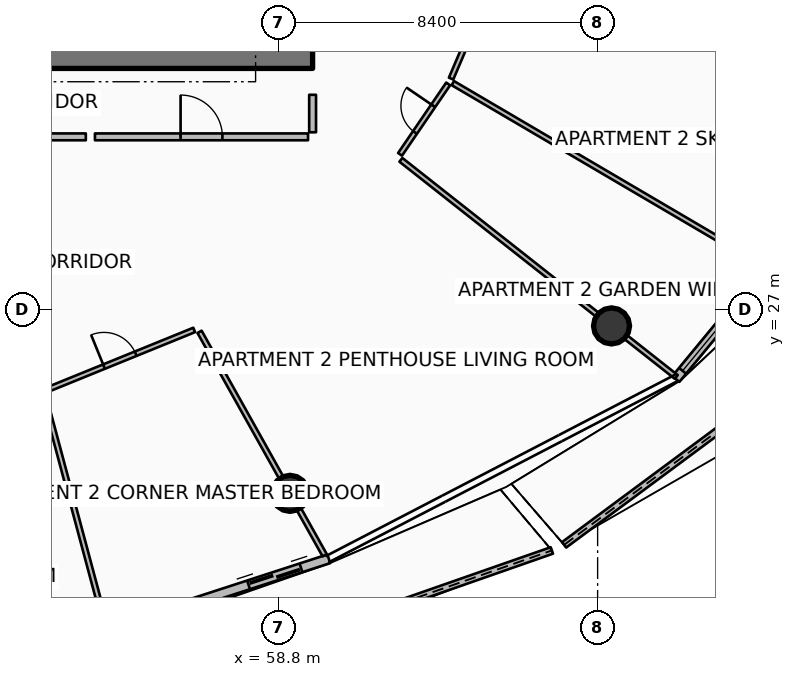
"""IFC4 building model, lengths in metres.
Left out: names, types, materials, properties, quantities, classifications, styles, units other than length and angle.
Written with IfcOpenShell. Run it as: python <this file> out.ifc"""

import sys

from ifc_helpers import new_model, si_unit, direction, frame, frame_2d, origin, origin_2d, place, context, subcontext, project, spatial, polyline, rectangle, circle, outline, extrude, element, fill, save


model = new_model("IFC4")
c1 = context("Model", 3, precision=1e-05, world=origin(), true_north=direction((0.0, 1.0)))
c2 = subcontext(c1, "Body", "Model", "MODEL_VIEW")
j1 = project(units=[si_unit("LENGTHUNIT", "METRE"), si_unit("PLANEANGLEUNIT", "RADIAN")], contexts=[c1])
p1 = place(None, origin())
s1 = spatial("IfcSite", under=j1, at=p1, CompositionType="ELEMENT")
p2 = place(p1, origin())
s2 = spatial("IfcBuilding", under=s1, at=p2, CompositionType="ELEMENT")
p3 = place(p2, frame((0.0, 0.0, 248.25)))
s3 = spatial("IfcBuildingStorey", under=s2, at=p3, CompositionType="ELEMENT", Elevation=248.25)
p4 = place(p3, frame((49.95, 33.675, 0.0), z_axis=(0.0, 0.0, 1.0), x_axis=(1.0, 0.0, 0.0)))
e1 = element("IfcWall", 1, at=p4, inside=s3, PredefinedType="SHEAR", context=c2, shape_type="SweptSolid", body=[
    extrude(rectangle(XDim=9.75, YDim=0.65, at=frame_2d((4.875, 0.0))), origin(), (0.0, 0.0, 1.0), 3.85),
])
for number, where, z_axis, x_axis in (
    (2, (59.105, 22.17, 0.0), (0.0, 0.0, 1.0), (1.0, 0.0, 0.0)),
    (3, (67.566, 26.575, 0.0), (0.0, 0.0, 1.0), (1.0, 0.0, 0.0)),
):
    element("IfcColumn", number, at=place(p3, frame(where, z_axis=z_axis, x_axis=x_axis)), inside=s3, PredefinedType="COLUMN", context=c2, shape_type="SweptSolid", body=[
        extrude(circle(Radius=0.475, at=origin_2d()), origin(), (0.0, 0.0, 1.0), 3.59),
    ])
p5 = place(p3, frame((56.173, 17.234, 0.0), z_axis=(0.0, 0.0, 1.0), x_axis=(0.944003849273, 0.329934436757, 0.0)))
e4 = element("IfcWall", 4, at=p5, inside=s3, PredefinedType="PARAPET", context=c2, shape_type="SweptSolid", body=[
    extrude(outline(polyline([(0.0, 0.0), (10.406, 0.0), (10.406, 1.483), (5.203, 1.284), (0.0, 1.148), (0.0, 0.0)])), frame((0.0, 0.09, 0.0), z_axis=(0.0, -1.0, 0.0), x_axis=(1.0, 0.0, 0.0)), (0.0, 0.0, 1.0), 0.18),
])
p6 = place(p3, frame((66.319, 20.815, 0.0), z_axis=(0.0, 0.0, 1.0), x_axis=(0.803330402034, 0.59553359701, 0.0)))
e5 = element("IfcWall", 5, at=p6, inside=s3, PredefinedType="PARAPET", context=c2, shape_type="SweptSolid", body=[
    extrude(outline(polyline([(0.0, 0.0), (11.674, 0.0), (11.674, 1.832), (5.837, 1.696), (0.0, 1.497), (0.0, 0.0)])), frame((0.0, 0.09, 0.0), z_axis=(0.0, -1.0, 0.0), x_axis=(1.0, 0.0, 0.0)), (0.0, 0.0, 1.0), 0.18),
])
p7 = place(p3, frame((50.858, 17.436, 0.0), z_axis=(0.0, 0.0, 1.0), x_axis=(0.951055974609, 0.309018661507, 0.0)))
e6 = element("IfcWall", 6, at=p7, inside=s3, PredefinedType="SOLIDWALL", context=c2, shape_type="SweptSolid", body=[
    extrude(rectangle(XDim=9.745, YDim=0.24, at=frame_2d((4.873, 0.0))), origin(), (0.0, 0.0, 1.0), 2.54),
])
p8 = place(p7, frame((7.525, 0.0, 0.0)))
e7 = element("IfcOpeningElement", 7, at=p8, cuts=e6, PredefinedType="OPENING", context=c2, shape_type="SweptSolid", body=[
    extrude(rectangle(XDim=1.45, YDim=2.15, at=frame_2d((0.725, 1.075))), frame((0.0, 0.13, 0.0), z_axis=(0.0, -1.0, 0.0), x_axis=(1.0, 0.0, 0.0)), (0.0, 0.0, 1.0), 0.26),
])
p9 = place(p7, frame((0.28, 0.0, 0.65)))
e8 = element("IfcOpeningElement", 8, at=p9, cuts=e6, PredefinedType="OPENING", context=c2, shape_type="SweptSolid", body=[
    extrude(rectangle(XDim=1.6, YDim=1.5, at=frame_2d((0.8, 0.75))), frame((0.0, 0.13, 0.0), z_axis=(0.0, -1.0, 0.0), x_axis=(1.0, 0.0, 0.0)), (0.0, 0.0, 1.0), 0.26),
])
p10 = place(p3, frame((69.258, 25.178, 0.0), z_axis=(0.0, 0.0, 1.0), x_axis=(0.636680093065, 0.771128043255, 0.0)))
e9 = element("IfcWall", 9, at=p10, inside=s3, PredefinedType="SOLIDWALL", context=c2, shape_type="SweptSolid", body=[
    extrude(rectangle(XDim=11.438, YDim=0.24, at=frame_2d((5.719, 0.0))), origin(), (0.0, 0.0, 1.0), 2.54),
])
p11 = place(p10, frame((9.218, 0.0, 0.0)))
e10 = element("IfcOpeningElement", 10, at=p11, cuts=e9, PredefinedType="OPENING", context=c2, shape_type="SweptSolid", body=[
    extrude(rectangle(XDim=1.45, YDim=2.15, at=frame_2d((0.725, 1.075))), frame((0.0, 0.13, 0.0), z_axis=(0.0, -1.0, 0.0), x_axis=(1.0, 0.0, 0.0)), (0.0, 0.0, 1.0), 0.26),
])
p12 = place(p10, frame((0.28, 0.0, 0.65)))
e11 = element("IfcOpeningElement", 11, at=p12, cuts=e9, PredefinedType="OPENING", context=c2, shape_type="SweptSolid", body=[
    extrude(rectangle(XDim=1.6, YDim=1.5, at=frame_2d((0.8, 0.75))), frame((0.0, 0.13, 0.0), z_axis=(0.0, -1.0, 0.0), x_axis=(1.0, 0.0, 0.0)), (0.0, 0.0, 1.0), 0.26),
])
p13 = place(p3, frame((53.972, 31.55, 0.0), z_axis=(0.0, 0.0, 1.0), x_axis=(1.0, 0.0, 0.0)))
e12 = element("IfcWall", 12, at=p13, inside=s3, PredefinedType="PARTITIONING", context=c2, shape_type="SweptSolid", body=[
    extrude(rectangle(XDim=5.608, YDim=0.18, at=frame_2d((2.804, 0.0))), origin(), (0.0, 0.0, 1.0), 2.957),
])
p14 = place(p13, frame((2.254, 0.0, 0.0)))
e13 = element("IfcOpeningElement", 13, at=p14, cuts=e12, PredefinedType="OPENING", context=c2, shape_type="SweptSolid", body=[
    extrude(rectangle(XDim=1.1, YDim=2.1, at=frame_2d((0.55, 1.05))), frame((0.0, 0.1, 0.0), z_axis=(0.0, -1.0, 0.0), x_axis=(1.0, 0.0, 0.0)), (0.0, 0.0, 1.0), 0.2),
])
p15 = place(p3, frame((59.7, 31.67, 0.0), z_axis=(0.0, 0.0, 1.0), x_axis=(0.0, 1.0, 0.0)))
e14 = element("IfcWall", 14, at=p15, inside=s3, PredefinedType="PARTITIONING", context=c2, shape_type="SweptSolid", body=[
    extrude(rectangle(XDim=0.987, YDim=0.18, at=frame_2d((0.493, 0.0))), origin(), (0.0, 0.0, 1.0), 2.957),
])
p16 = place(p3, frame((49.357, 31.55, 0.0), z_axis=(0.0, 0.0, 1.0), x_axis=(1.0, 0.0, 0.0)))
e15 = element("IfcWall", 15, at=p16, inside=s3, PredefinedType="PARTITIONING", context=c2, shape_type="SweptSolid", body=[
    extrude(rectangle(XDim=4.376, YDim=0.18, at=frame_2d((2.188, 0.0))), origin(), (0.0, 0.0, 1.0), 2.957),
])
p17 = place(p3, frame((56.725, 26.42, 0.0), z_axis=(0.0, 0.0, 1.0), x_axis=(0.488624332812, -0.872494275846, 0.0)))
e16 = element("IfcWall", 16, at=p17, inside=s3, PredefinedType="PARTITIONING", context=c2, shape_type="SweptSolid", body=[
    extrude(rectangle(XDim=6.738, YDim=0.125, at=frame_2d((3.369, 0.0))), origin(), (0.0, 0.0, 1.0), 2.957),
])
p18 = place(p3, frame((52.621, 24.762, 0.0), z_axis=(0.0, 0.0, 1.0), x_axis=(0.258970884365, -0.96588512829, 0.0)))
e17 = element("IfcWall", 17, at=p18, inside=s3, PredefinedType="PARTITIONING", context=c2, shape_type="SweptSolid", body=[
    extrude(rectangle(XDim=6.306, YDim=0.125, at=frame_2d((3.153, 0.0))), origin(), (0.0, 0.0, 1.0), 3.03),
])
p19 = place(p3, frame((52.672, 24.879, 0.0), z_axis=(0.0, 0.0, 1.0), x_axis=(0.926344303187, 0.376677888857, 0.0)))
e18 = element("IfcWall", 18, at=p19, inside=s3, PredefinedType="PARTITIONING", context=c2, shape_type="SweptSolid", body=[
    extrude(rectangle(XDim=4.223, YDim=0.125, at=frame_2d((2.111, 0.0))), origin(), (0.0, 0.0, 1.0), 2.957),
])
p20 = place(p19, frame((1.661, 0.0, 0.0)))
e19 = element("IfcOpeningElement", 19, at=p20, cuts=e18, PredefinedType="OPENING", context=c2, shape_type="SweptSolid", body=[
    extrude(rectangle(XDim=0.9, YDim=2.08, at=frame_2d((0.45, 1.04))), frame((0.0, 0.073, 0.0), z_axis=(0.0, -1.0, 0.0), x_axis=(1.0, 0.0, 0.0)), (0.0, 0.0, 1.0), 0.145),
])
p21 = place(p3, frame((62.023, 30.945, 0.0), z_axis=(0.0, 0.0, 1.0), x_axis=(0.785322102606, -0.619087388952, 0.0)))
e20 = element("IfcWall", 20, at=p21, inside=s3, PredefinedType="PARTITIONING", context=c2, shape_type="SweptSolid", body=[
    extrude(rectangle(XDim=9.228, YDim=0.125, at=frame_2d((4.614, 0.0))), origin(), (0.0, 0.0, 1.0), 2.957),
])
p22 = place(p3, frame((63.39, 32.963, 0.0), z_axis=(0.0, 0.0, 1.0), x_axis=(0.862331921897, -0.506343417532, 0.0)))
e21 = element("IfcWall", 21, at=p22, inside=s3, PredefinedType="PARTITIONING", context=c2, shape_type="SweptSolid", body=[
    extrude(rectangle(XDim=9.478, YDim=0.125, at=frame_2d((4.739, 0.0))), origin(), (0.0, 0.0, 1.0), 3.03),
])
p23 = place(p3, frame((62.001, 31.089, 0.0), z_axis=(0.0, 0.0, 1.0), x_axis=(0.564052095913, 0.825739204044, 0.0)))
e22 = element("IfcWall", 22, at=p23, inside=s3, PredefinedType="PARTITIONING", context=c2, shape_type="SweptSolid", body=[
    extrude(rectangle(XDim=2.245, YDim=0.125, at=frame_2d((1.122, 0.0))), origin(), (0.0, 0.0, 1.0), 2.957),
])
p24 = place(p23, frame((0.698, 0.0, 0.0)))
e23 = element("IfcOpeningElement", 23, at=p24, cuts=e22, PredefinedType="OPENING", context=c2, shape_type="SweptSolid", body=[
    extrude(rectangle(XDim=0.85, YDim=2.06, at=frame_2d((0.425, 1.03))), frame((0.0, 0.073, 0.0), z_axis=(0.0, -1.0, 0.0), x_axis=(1.0, 0.0, 0.0)), (0.0, 0.0, 1.0), 0.145),
])
p25 = place(p3, frame((63.344, 33.083, 0.0), z_axis=(0.0, 0.0, 1.0), x_axis=(0.392064212371, 0.919937852998, 0.0)))
e24 = element("IfcWall", 24, at=p25, inside=s3, PredefinedType="PARTITIONING", context=c2, shape_type="SweptSolid", body=[
    extrude(rectangle(XDim=4.354, YDim=0.125, at=frame_2d((2.177, 0.0))), origin(), (0.0, 0.0, 1.0), 2.957),
])
p26 = place(p25, frame((1.727, 0.0, 0.0)))
e25 = element("IfcOpeningElement", 25, at=p26, cuts=e24, PredefinedType="OPENING", context=c2, shape_type="SweptSolid", body=[
    extrude(rectangle(XDim=0.9, YDim=2.08, at=frame_2d((0.45, 1.04))), frame((0.0, 0.073, 0.0), z_axis=(0.0, -1.0, 0.0), x_axis=(1.0, 0.0, 0.0)), (0.0, 0.0, 1.0), 0.145),
])
p27 = place(p8, origin())
e26 = element("IfcDoor", 26, at=p27, inside=s3, OperationType="DOUBLE_DOOR_SLIDING", PredefinedType="DOOR", context=c2, shape_type="SweptSolid", body=[
    extrude(rectangle(XDim=1.45, YDim=2.15, at=frame_2d((0.725, 1.075))), frame((0.0, 0.025, 0.0), z_axis=(0.0, -1.0, 0.0), x_axis=(1.0, 0.0, 0.0)), (0.0, 0.0, 1.0), 0.05),
])
fill(e7, e26)
p28 = place(p12, origin())
e27 = element("IfcWindow", 27, at=p28, inside=s3, PartitioningType="SINGLE_PANEL", PredefinedType="WINDOW", context=c2, shape_type="SweptSolid", body=[
    extrude(rectangle(XDim=1.6, YDim=1.5, at=frame_2d((0.8, 0.75))), frame((0.0, 0.03, 0.0), z_axis=(0.0, -1.0, 0.0), x_axis=(1.0, 0.0, 0.0)), (0.0, 0.0, 1.0), 0.06),
])
fill(e11, e27)
p29 = place(p14, origin())
e28 = element("IfcDoor", 28, at=p29, inside=s3, OperationType="SINGLE_SWING_LEFT", PredefinedType="DOOR", context=c2, shape_type="SweptSolid", body=[
    extrude(rectangle(XDim=1.1, YDim=2.1, at=frame_2d((0.55, 1.05))), frame((0.0, 0.025, 0.0), z_axis=(0.0, -1.0, 0.0), x_axis=(1.0, 0.0, 0.0)), (0.0, 0.0, 1.0), 0.05),
])
fill(e13, e28)
p30 = place(p20, origin())
e29 = element("IfcDoor", 29, at=p30, inside=s3, OperationType="SINGLE_SWING_LEFT", PredefinedType="DOOR", context=c2, shape_type="SweptSolid", body=[
    extrude(rectangle(XDim=0.9, YDim=2.08, at=frame_2d((0.45, 1.04))), frame((0.0, 0.025, 0.0), z_axis=(0.0, -1.0, 0.0), x_axis=(1.0, 0.0, 0.0)), (0.0, 0.0, 1.0), 0.05),
])
fill(e19, e29)
p31 = place(p24, origin())
e30 = element("IfcDoor", 30, at=p31, inside=s3, OperationType="SINGLE_SWING_RIGHT", PredefinedType="DOOR", context=c2, shape_type="SweptSolid", body=[
    extrude(rectangle(XDim=0.85, YDim=2.06, at=frame_2d((0.425, 1.03))), frame((0.0, 0.025, 0.0), z_axis=(0.0, -1.0, 0.0), x_axis=(1.0, 0.0, 0.0)), (0.0, 0.0, 1.0), 0.05),
])
fill(e23, e30)
save(model, sys.argv[1])
